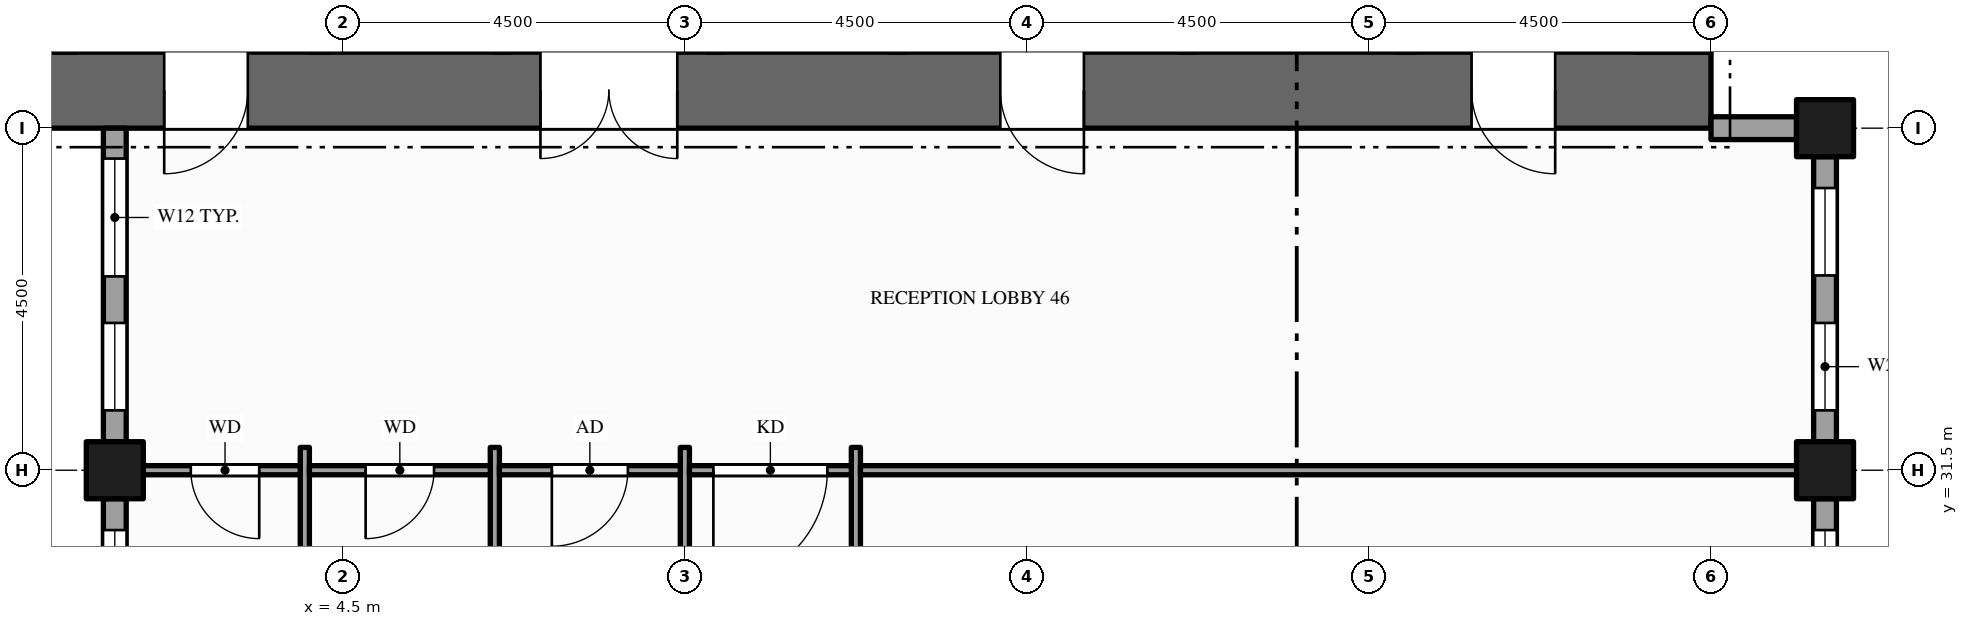
"""IFC4 building model, lengths in metres.
Left out: names, types, materials, properties, quantities, classifications, styles, units other than length and angle.
Written with IfcOpenShell. Run it as: python <this file> out.ifc"""

import sys

from ifc_helpers import new_model, si_unit, direction, frame, frame_2d, origin, origin_2d, place, context, subcontext, project, spatial, rectangle, hollow_rectangle, extrude, element, fill, save


model = new_model("IFC4")
c1 = context("Model", 3, precision=1e-05, world=origin(), true_north=direction((0.0, 1.0)))
c2 = subcontext(c1, "Body", "Model", "MODEL_VIEW")
j1 = project(units=[si_unit("LENGTHUNIT", "METRE"), si_unit("PLANEANGLEUNIT", "RADIAN")], contexts=[c1])
p1 = place(None, origin())
s1 = spatial("IfcSite", under=j1, at=p1, CompositionType="ELEMENT")
p2 = place(p1, origin())
s2 = spatial("IfcBuilding", under=s1, at=p2, CompositionType="ELEMENT")
p3 = place(p2, frame((0.0, 0.0, 239.0)))
s3 = spatial("IfcBuildingStorey", under=s2, at=p3, CompositionType="ELEMENT", Elevation=239.0)
p4 = place(p3, frame((0.0, 36.5, -0.15), z_axis=(0.0, 0.0, 1.0), x_axis=(1.0, 0.0, 0.0)))
e1 = element("IfcWall", 1, at=p4, inside=s3, PredefinedType="SHEAR", context=c2, shape_type="SweptSolid", body=[
    extrude(rectangle(XDim=22.5, YDim=1.0, at=frame_2d((11.25, 0.0))), origin(), (0.0, 0.0, 1.0), 4.0),
])
p5 = place(p4, frame((7.1, 0.0, 0.15)))
e2 = element("IfcOpeningElement", 2, at=p5, cuts=e1, PredefinedType="OPENING", context=c2, shape_type="SweptSolid", body=[
    extrude(rectangle(XDim=1.8, YDim=2.1, at=frame_2d((0.9, 1.05))), frame((0.0, 0.51, 0.0), z_axis=(0.0, -1.0, 0.0), x_axis=(1.0, 0.0, 0.0)), (0.0, 0.0, 1.0), 1.02),
])
p6 = place(p4, frame((13.15, 0.0, 0.15)))
e3 = element("IfcOpeningElement", 3, at=p6, cuts=e1, PredefinedType="OPENING", context=c2, shape_type="SweptSolid", body=[
    extrude(rectangle(XDim=1.1, YDim=2.1, at=frame_2d((0.55, 1.05))), frame((0.0, 0.51, 0.0), z_axis=(0.0, -1.0, 0.0), x_axis=(1.0, 0.0, 0.0)), (0.0, 0.0, 1.0), 1.02),
])
p7 = place(p4, frame((2.15, 0.0, 0.15)))
e4 = element("IfcOpeningElement", 4, at=p7, cuts=e1, PredefinedType="OPENING", context=c2, shape_type="SweptSolid", body=[
    extrude(rectangle(XDim=1.1, YDim=2.1, at=frame_2d((0.55, 1.05))), frame((0.0, 0.51, 0.0), z_axis=(0.0, -1.0, 0.0), x_axis=(1.0, 0.0, 0.0)), (0.0, 0.0, 1.0), 1.02),
])
p8 = place(p4, frame((19.35, 0.0, 0.15)))
e5 = element("IfcOpeningElement", 5, at=p8, cuts=e1, PredefinedType="OPENING", context=c2, shape_type="SweptSolid", body=[
    extrude(rectangle(XDim=1.1, YDim=2.1, at=frame_2d((0.55, 1.05))), frame((0.0, 0.51, 0.0), z_axis=(0.0, -1.0, 0.0), x_axis=(1.0, 0.0, 0.0)), (0.0, 0.0, 1.0), 1.02),
])
for number, where, z_axis, x_axis in (
    (6, (1.5, 31.5, -0.15), (0.0, 0.0, 1.0), (1.0, 0.0, 0.0)),
    (7, (24.0, 31.5, -0.15), (0.0, 0.0, 1.0), (1.0, 0.0, 0.0)),
    (8, (24.0, 36.0, -0.15), (0.0, 0.0, 1.0), (1.0, 0.0, 0.0)),
):
    element("IfcColumn", number, at=place(p3, frame(where, z_axis=z_axis, x_axis=x_axis)), inside=s3, PredefinedType="COLUMN", context=c2, shape_type="SweptSolid", body=[
        extrude(hollow_rectangle(XDim=0.75, YDim=0.75, WallThickness=0.036, at=origin_2d()), origin(), (0.0, 0.0, 1.0), 3.85),
    ])
p9 = place(p3, frame((24.0, 25.875, 0.0), z_axis=(0.0, 0.0, 1.0), x_axis=(0.0, 1.0, 0.0)))
e9 = element("IfcWall", 9, at=p9, inside=s3, PredefinedType="STANDARD", context=c2, shape_type="SweptSolid", body=[
    extrude(rectangle(XDim=5.25, YDim=0.3, at=frame_2d((2.625, 0.0))), origin(), (0.0, 0.0, 1.0), 3.007),
])
p10 = place(p9, frame((1.425, 0.0, 0.9)))
e10 = element("IfcOpeningElement", 10, at=p10, cuts=e9, PredefinedType="OPENING", context=c2, shape_type="SweptSolid", body=[
    extrude(rectangle(XDim=1.65, YDim=1.75, at=frame_2d((0.825, 0.875))), frame((0.0, 0.16, 0.0), z_axis=(0.0, -1.0, 0.0), x_axis=(1.0, 0.0, 0.0)), (0.0, 0.0, 1.0), 0.32),
])
p11 = place(p9, frame((3.688, 0.0, 0.9)))
e11 = element("IfcOpeningElement", 11, at=p11, cuts=e9, PredefinedType="OPENING", context=c2, shape_type="SweptSolid", body=[
    extrude(rectangle(XDim=1.15, YDim=1.75, at=frame_2d((0.575, 0.875))), frame((0.0, 0.16, 0.0), z_axis=(0.0, -1.0, 0.0), x_axis=(1.0, 0.0, 0.0)), (0.0, 0.0, 1.0), 0.32),
])
p12 = place(p3, frame((24.0, 31.875, 0.0), z_axis=(0.0, 0.0, 1.0), x_axis=(0.0, 1.0, 0.0)))
e12 = element("IfcWall", 12, at=p12, inside=s3, PredefinedType="STANDARD", context=c2, shape_type="SweptSolid", body=[
    extrude(rectangle(XDim=3.75, YDim=0.3, at=frame_2d((1.875, 0.0))), origin(), (0.0, 0.0, 1.0), 3.007),
])
p13 = place(p12, frame((0.413, 0.0, 0.9)))
e13 = element("IfcOpeningElement", 13, at=p13, cuts=e12, PredefinedType="OPENING", context=c2, shape_type="SweptSolid", body=[
    extrude(rectangle(XDim=1.15, YDim=1.75, at=frame_2d((0.575, 0.875))), frame((0.0, 0.16, 0.0), z_axis=(0.0, -1.0, 0.0), x_axis=(1.0, 0.0, 0.0)), (0.0, 0.0, 1.0), 0.32),
])
p14 = place(p12, frame((2.188, 0.0, 0.9)))
e14 = element("IfcOpeningElement", 14, at=p14, cuts=e12, PredefinedType="OPENING", context=c2, shape_type="SweptSolid", body=[
    extrude(rectangle(XDim=1.15, YDim=1.75, at=frame_2d((0.575, 0.875))), frame((0.0, 0.16, 0.0), z_axis=(0.0, -1.0, 0.0), x_axis=(1.0, 0.0, 0.0)), (0.0, 0.0, 1.0), 0.32),
])
p15 = place(p3, frame((23.625, 36.0, 0.0), z_axis=(0.0, 0.0, 1.0), x_axis=(-1.0, 0.0, 0.0)))
e15 = element("IfcWall", 15, at=p15, inside=s3, PredefinedType="STANDARD", context=c2, shape_type="SweptSolid", body=[
    extrude(rectangle(XDim=1.125, YDim=0.3, at=frame_2d((0.562, 0.0))), origin(), (0.0, 0.0, 1.0), 3.007),
])
p16 = place(p3, frame((1.5, 36.0, 0.0), z_axis=(0.0, 0.0, 1.0), x_axis=(0.0, -1.0, 0.0)))
e16 = element("IfcWall", 16, at=p16, inside=s3, PredefinedType="STANDARD", context=c2, shape_type="SweptSolid", body=[
    extrude(rectangle(XDim=4.125, YDim=0.3, at=frame_2d((2.062, 0.0))), origin(), (0.0, 0.0, 1.0), 3.007),
])
p17 = place(p16, frame((0.4, 0.0, 0.9)))
e17 = element("IfcOpeningElement", 17, at=p17, cuts=e16, PredefinedType="OPENING", context=c2, shape_type="SweptSolid", body=[
    extrude(rectangle(XDim=1.55, YDim=1.75, at=frame_2d((0.775, 0.875))), frame((0.0, 0.16, 0.0), z_axis=(0.0, -1.0, 0.0), x_axis=(1.0, 0.0, 0.0)), (0.0, 0.0, 1.0), 0.32),
])
p18 = place(p16, frame((2.562, 0.0, 0.9)))
e18 = element("IfcOpeningElement", 18, at=p18, cuts=e16, PredefinedType="OPENING", context=c2, shape_type="SweptSolid", body=[
    extrude(rectangle(XDim=1.15, YDim=1.75, at=frame_2d((0.575, 0.875))), frame((0.0, 0.16, 0.0), z_axis=(0.0, -1.0, 0.0), x_axis=(1.0, 0.0, 0.0)), (0.0, 0.0, 1.0), 0.32),
])
p19 = place(p3, frame((1.5, 31.125, 0.0), z_axis=(0.0, 0.0, 1.0), x_axis=(0.0, -1.0, 0.0)))
e19 = element("IfcWall", 19, at=p19, inside=s3, PredefinedType="STANDARD", context=c2, shape_type="SweptSolid", body=[
    extrude(rectangle(XDim=3.75, YDim=0.3, at=frame_2d((1.875, 0.0))), origin(), (0.0, 0.0, 1.0), 3.007),
])
p20 = place(p19, frame((0.413, 0.0, 0.9)))
e20 = element("IfcOpeningElement", 20, at=p20, cuts=e19, PredefinedType="OPENING", context=c2, shape_type="SweptSolid", body=[
    extrude(rectangle(XDim=1.15, YDim=1.75, at=frame_2d((0.575, 0.875))), frame((0.0, 0.16, 0.0), z_axis=(0.0, -1.0, 0.0), x_axis=(1.0, 0.0, 0.0)), (0.0, 0.0, 1.0), 0.32),
])
p21 = place(p19, frame((2.188, 0.0, 0.9)))
e21 = element("IfcOpeningElement", 21, at=p21, cuts=e19, PredefinedType="OPENING", context=c2, shape_type="SweptSolid", body=[
    extrude(rectangle(XDim=1.15, YDim=1.75, at=frame_2d((0.575, 0.875))), frame((0.0, 0.16, 0.0), z_axis=(0.0, -1.0, 0.0), x_axis=(1.0, 0.0, 0.0)), (0.0, 0.0, 1.0), 0.32),
])
for number, where, z_axis, x_axis in (
    (22, (4.0, 26.7, 0.0), (0.0, 0.0, 1.0), (0.0, 1.0, 0.0)),
    (23, (6.5, 26.7, 0.0), (0.0, 0.0, 1.0), (0.0, 1.0, 0.0)),
):
    element("IfcWall", number, at=place(p3, frame(where, z_axis=z_axis, x_axis=x_axis)), inside=s3, PredefinedType="PARTITIONING", context=c2, shape_type="SweptSolid", body=[
        extrude(rectangle(XDim=5.1, YDim=0.12, at=frame_2d((2.55, 0.0))), origin(), (0.0, 0.0, 1.0), 3.7),
    ])
p22 = place(p3, frame((9.0, 13.2, 0.0), z_axis=(0.0, 0.0, 1.0), x_axis=(0.0, 1.0, 0.0)))
e24 = element("IfcWall", 24, at=p22, inside=s3, PredefinedType="PARTITIONING", context=c2, shape_type="SweptSolid", body=[
    extrude(rectangle(XDim=18.6, YDim=0.12, at=frame_2d((9.3, 0.0))), origin(), (0.0, 0.0, 1.0), 2.72),
])
p23 = place(p22, frame((3.175, 0.0, 0.0)))
e25 = element("IfcOpeningElement", 25, at=p23, cuts=e24, PredefinedType="OPENING", context=c2, shape_type="SweptSolid", body=[
    extrude(rectangle(XDim=1.0, YDim=2.1, at=frame_2d((0.5, 1.05))), frame((0.0, 0.07, 0.0), z_axis=(0.0, -1.0, 0.0), x_axis=(1.0, 0.0, 0.0)), (0.0, 0.0, 1.0), 0.14),
])
p24 = place(p22, frame((9.955, 0.0, 0.0)))
e26 = element("IfcOpeningElement", 26, at=p24, cuts=e24, PredefinedType="OPENING", context=c2, shape_type="SweptSolid", body=[
    extrude(rectangle(XDim=1.0, YDim=2.1, at=frame_2d((0.5, 1.05))), frame((0.0, 0.07, 0.0), z_axis=(0.0, -1.0, 0.0), x_axis=(1.0, 0.0, 0.0)), (0.0, 0.0, 1.0), 0.14),
])
p25 = place(p3, frame((11.25, 13.2, 0.0), z_axis=(0.0, 0.0, 1.0), x_axis=(0.0, 1.0, 0.0)))
e27 = element("IfcWall", 27, at=p25, inside=s3, PredefinedType="PARTITIONING", context=c2, shape_type="SweptSolid", body=[
    extrude(rectangle(XDim=18.6, YDim=0.12, at=frame_2d((9.3, 0.0))), origin(), (0.0, 0.0, 1.0), 2.72),
])
p26 = place(p25, frame((4.2, 0.0, 0.0)))
e28 = element("IfcOpeningElement", 28, at=p26, cuts=e27, PredefinedType="OPENING", context=c2, shape_type="SweptSolid", body=[
    extrude(rectangle(XDim=1.2, YDim=2.1, at=frame_2d((0.6, 1.05))), frame((0.0, 0.07, 0.0), z_axis=(0.0, -1.0, 0.0), x_axis=(1.0, 0.0, 0.0)), (0.0, 0.0, 1.0), 0.14),
])
p27 = place(p3, frame((1.65, 31.5, 0.0), z_axis=(0.0, 0.0, 1.0), x_axis=(1.0, 0.0, 0.0)))
e29 = element("IfcWall", 29, at=p27, inside=s3, PredefinedType="PARTITIONING", context=c2, shape_type="SweptSolid", body=[
    extrude(rectangle(XDim=2.29, YDim=0.12, at=frame_2d((1.145, 0.0))), origin(), (0.0, 0.0, 1.0), 2.72),
])
p28 = place(p27, frame((0.85, 0.0, 0.0)))
e30 = element("IfcOpeningElement", 30, at=p28, cuts=e29, PredefinedType="OPENING", context=c2, shape_type="SweptSolid", body=[
    extrude(rectangle(XDim=0.9, YDim=2.1, at=frame_2d((0.45, 1.05))), frame((0.0, 0.07, 0.0), z_axis=(0.0, -1.0, 0.0), x_axis=(1.0, 0.0, 0.0)), (0.0, 0.0, 1.0), 0.14),
])
p29 = place(p3, frame((4.06, 31.5, 0.0), z_axis=(0.0, 0.0, 1.0), x_axis=(1.0, 0.0, 0.0)))
e31 = element("IfcWall", 31, at=p29, inside=s3, PredefinedType="PARTITIONING", context=c2, shape_type="SweptSolid", body=[
    extrude(rectangle(XDim=2.38, YDim=0.12, at=frame_2d((1.19, 0.0))), origin(), (0.0, 0.0, 1.0), 2.72),
])
p30 = place(p29, frame((0.74, 0.0, 0.0)))
e32 = element("IfcOpeningElement", 32, at=p30, cuts=e31, PredefinedType="OPENING", context=c2, shape_type="SweptSolid", body=[
    extrude(rectangle(XDim=0.9, YDim=2.1, at=frame_2d((0.45, 1.05))), frame((0.0, 0.07, 0.0), z_axis=(0.0, -1.0, 0.0), x_axis=(1.0, 0.0, 0.0)), (0.0, 0.0, 1.0), 0.14),
])
p31 = place(p3, frame((6.56, 31.5, 0.0), z_axis=(0.0, 0.0, 1.0), x_axis=(1.0, 0.0, 0.0)))
e33 = element("IfcWall", 33, at=p31, inside=s3, PredefinedType="PARTITIONING", context=c2, shape_type="SweptSolid", body=[
    extrude(rectangle(XDim=2.38, YDim=0.12, at=frame_2d((1.19, 0.0))), origin(), (0.0, 0.0, 1.0), 2.72),
])
p32 = place(p31, frame((0.69, 0.0, 0.0)))
e34 = element("IfcOpeningElement", 34, at=p32, cuts=e33, PredefinedType="OPENING", context=c2, shape_type="SweptSolid", body=[
    extrude(rectangle(XDim=1.0, YDim=2.1, at=frame_2d((0.5, 1.05))), frame((0.0, 0.07, 0.0), z_axis=(0.0, -1.0, 0.0), x_axis=(1.0, 0.0, 0.0)), (0.0, 0.0, 1.0), 0.14),
])
p33 = place(p3, frame((9.06, 31.5, 0.0), z_axis=(0.0, 0.0, 1.0), x_axis=(1.0, 0.0, 0.0)))
e35 = element("IfcWall", 35, at=p33, inside=s3, PredefinedType="PARTITIONING", context=c2, shape_type="SweptSolid", body=[
    extrude(rectangle(XDim=2.13, YDim=0.12, at=frame_2d((1.065, 0.0))), origin(), (0.0, 0.0, 1.0), 2.72),
])
p34 = place(p33, frame((0.315, 0.0, 0.0)))
e36 = element("IfcOpeningElement", 36, at=p34, cuts=e35, PredefinedType="OPENING", context=c2, shape_type="SweptSolid", body=[
    extrude(rectangle(XDim=1.5, YDim=2.1, at=frame_2d((0.75, 1.05))), frame((0.0, 0.07, 0.0), z_axis=(0.0, -1.0, 0.0), x_axis=(1.0, 0.0, 0.0)), (0.0, 0.0, 1.0), 0.14),
])
p35 = place(p3, frame((11.31, 31.5, 0.0), z_axis=(0.0, 0.0, 1.0), x_axis=(1.0, 0.0, 0.0)))
e37 = element("IfcWall", 37, at=p35, inside=s3, PredefinedType="PARTITIONING", context=c2, shape_type="SweptSolid", body=[
    extrude(rectangle(XDim=12.54, YDim=0.12, at=frame_2d((6.27, 0.0))), origin(), (0.0, 0.0, 1.0), 2.72),
])
p36 = place(p11, origin())
e38 = element("IfcWindow", 38, at=p36, inside=s3, PartitioningType="SINGLE_PANEL", PredefinedType="WINDOW", context=c2, shape_type="SweptSolid", body=[
    extrude(rectangle(XDim=1.15, YDim=1.75, at=frame_2d((0.575, 0.875))), frame((0.0, 0.03, 0.0), z_axis=(0.0, -1.0, 0.0), x_axis=(1.0, 0.0, 0.0)), (0.0, 0.0, 1.0), 0.06),
])
fill(e11, e38)
p37 = place(p13, origin())
e39 = element("IfcWindow", 39, at=p37, inside=s3, PartitioningType="SINGLE_PANEL", PredefinedType="WINDOW", context=c2, shape_type="SweptSolid", body=[
    extrude(rectangle(XDim=1.15, YDim=1.75, at=frame_2d((0.575, 0.875))), frame((0.0, 0.03, 0.0), z_axis=(0.0, -1.0, 0.0), x_axis=(1.0, 0.0, 0.0)), (0.0, 0.0, 1.0), 0.06),
])
fill(e13, e39)
p38 = place(p14, origin())
e40 = element("IfcWindow", 40, at=p38, inside=s3, PartitioningType="SINGLE_PANEL", PredefinedType="WINDOW", context=c2, shape_type="SweptSolid", body=[
    extrude(rectangle(XDim=1.15, YDim=1.75, at=frame_2d((0.575, 0.875))), frame((0.0, 0.03, 0.0), z_axis=(0.0, -1.0, 0.0), x_axis=(1.0, 0.0, 0.0)), (0.0, 0.0, 1.0), 0.06),
])
fill(e14, e40)
p39 = place(p17, origin())
e41 = element("IfcWindow", 41, at=p39, inside=s3, PartitioningType="SINGLE_PANEL", PredefinedType="WINDOW", context=c2, shape_type="SweptSolid", body=[
    extrude(rectangle(XDim=1.55, YDim=1.75, at=frame_2d((0.775, 0.875))), frame((0.0, 0.03, 0.0), z_axis=(0.0, -1.0, 0.0), x_axis=(1.0, 0.0, 0.0)), (0.0, 0.0, 1.0), 0.06),
])
fill(e17, e41)
p40 = place(p18, origin())
e42 = element("IfcWindow", 42, at=p40, inside=s3, PartitioningType="SINGLE_PANEL", PredefinedType="WINDOW", context=c2, shape_type="SweptSolid", body=[
    extrude(rectangle(XDim=1.15, YDim=1.75, at=frame_2d((0.575, 0.875))), frame((0.0, 0.03, 0.0), z_axis=(0.0, -1.0, 0.0), x_axis=(1.0, 0.0, 0.0)), (0.0, 0.0, 1.0), 0.06),
])
fill(e18, e42)
p41 = place(p20, origin())
e43 = element("IfcWindow", 43, at=p41, inside=s3, PartitioningType="SINGLE_PANEL", PredefinedType="WINDOW", context=c2, shape_type="SweptSolid", body=[
    extrude(rectangle(XDim=1.15, YDim=1.75, at=frame_2d((0.575, 0.875))), frame((0.0, 0.03, 0.0), z_axis=(0.0, -1.0, 0.0), x_axis=(1.0, 0.0, 0.0)), (0.0, 0.0, 1.0), 0.06),
])
fill(e20, e43)
p42 = place(p5, origin())
e44 = element("IfcDoor", 44, at=p42, inside=s3, OperationType="DOUBLE_DOOR_SINGLE_SWING", PredefinedType="DOOR", context=c2, shape_type="SweptSolid", body=[
    extrude(rectangle(XDim=1.8, YDim=2.1, at=frame_2d((0.9, 1.05))), frame((0.0, 0.025, 0.0), z_axis=(0.0, -1.0, 0.0), x_axis=(1.0, 0.0, 0.0)), (0.0, 0.0, 1.0), 0.05),
])
fill(e2, e44)
p43 = place(p6, origin())
e45 = element("IfcDoor", 45, at=p43, inside=s3, OperationType="SINGLE_SWING_RIGHT", PredefinedType="DOOR", context=c2, shape_type="SweptSolid", body=[
    extrude(rectangle(XDim=1.1, YDim=2.1, at=frame_2d((0.55, 1.05))), frame((0.0, 0.025, 0.0), z_axis=(0.0, -1.0, 0.0), x_axis=(1.0, 0.0, 0.0)), (0.0, 0.0, 1.0), 0.05),
])
fill(e3, e45)
p44 = place(p7, origin())
e46 = element("IfcDoor", 46, at=p44, inside=s3, OperationType="SINGLE_SWING_LEFT", PredefinedType="DOOR", context=c2, shape_type="SweptSolid", body=[
    extrude(rectangle(XDim=1.1, YDim=2.1, at=frame_2d((0.55, 1.05))), frame((0.0, 0.025, 0.0), z_axis=(0.0, -1.0, 0.0), x_axis=(1.0, 0.0, 0.0)), (0.0, 0.0, 1.0), 0.05),
])
fill(e4, e46)
p45 = place(p8, origin())
e47 = element("IfcDoor", 47, at=p45, inside=s3, OperationType="SINGLE_SWING_RIGHT", PredefinedType="DOOR", context=c2, shape_type="SweptSolid", body=[
    extrude(rectangle(XDim=1.1, YDim=2.1, at=frame_2d((0.55, 1.05))), frame((0.0, 0.025, 0.0), z_axis=(0.0, -1.0, 0.0), x_axis=(1.0, 0.0, 0.0)), (0.0, 0.0, 1.0), 0.05),
])
fill(e5, e47)
p46 = place(p34, origin())
e48 = element("IfcDoor", 48, at=p46, inside=s3, OperationType="SINGLE_SWING_LEFT", PredefinedType="DOOR", context=c2, shape_type="SweptSolid", body=[
    extrude(rectangle(XDim=1.5, YDim=2.1, at=frame_2d((0.75, 1.05))), frame((0.0, 0.025, 0.0), z_axis=(0.0, -1.0, 0.0), x_axis=(1.0, 0.0, 0.0)), (0.0, 0.0, 1.0), 0.05),
])
fill(e36, e48)
p47 = place(p28, origin())
e49 = element("IfcDoor", 49, at=p47, inside=s3, OperationType="SINGLE_SWING_RIGHT", PredefinedType="DOOR", context=c2, shape_type="SweptSolid", body=[
    extrude(rectangle(XDim=0.9, YDim=2.1, at=frame_2d((0.45, 1.05))), frame((0.0, 0.025, 0.0), z_axis=(0.0, -1.0, 0.0), x_axis=(1.0, 0.0, 0.0)), (0.0, 0.0, 1.0), 0.05),
])
fill(e30, e49)
p48 = place(p30, origin())
e50 = element("IfcDoor", 50, at=p48, inside=s3, OperationType="SINGLE_SWING_LEFT", PredefinedType="DOOR", context=c2, shape_type="SweptSolid", body=[
    extrude(rectangle(XDim=0.9, YDim=2.1, at=frame_2d((0.45, 1.05))), frame((0.0, 0.025, 0.0), z_axis=(0.0, -1.0, 0.0), x_axis=(1.0, 0.0, 0.0)), (0.0, 0.0, 1.0), 0.05),
])
fill(e32, e50)
p49 = place(p32, origin())
e51 = element("IfcDoor", 51, at=p49, inside=s3, OperationType="SINGLE_SWING_LEFT", PredefinedType="DOOR", context=c2, shape_type="SweptSolid", body=[
    extrude(rectangle(XDim=1.0, YDim=2.1, at=frame_2d((0.5, 1.05))), frame((0.0, 0.025, 0.0), z_axis=(0.0, -1.0, 0.0), x_axis=(1.0, 0.0, 0.0)), (0.0, 0.0, 1.0), 0.05),
])
fill(e34, e51)
save(model, sys.argv[1])
